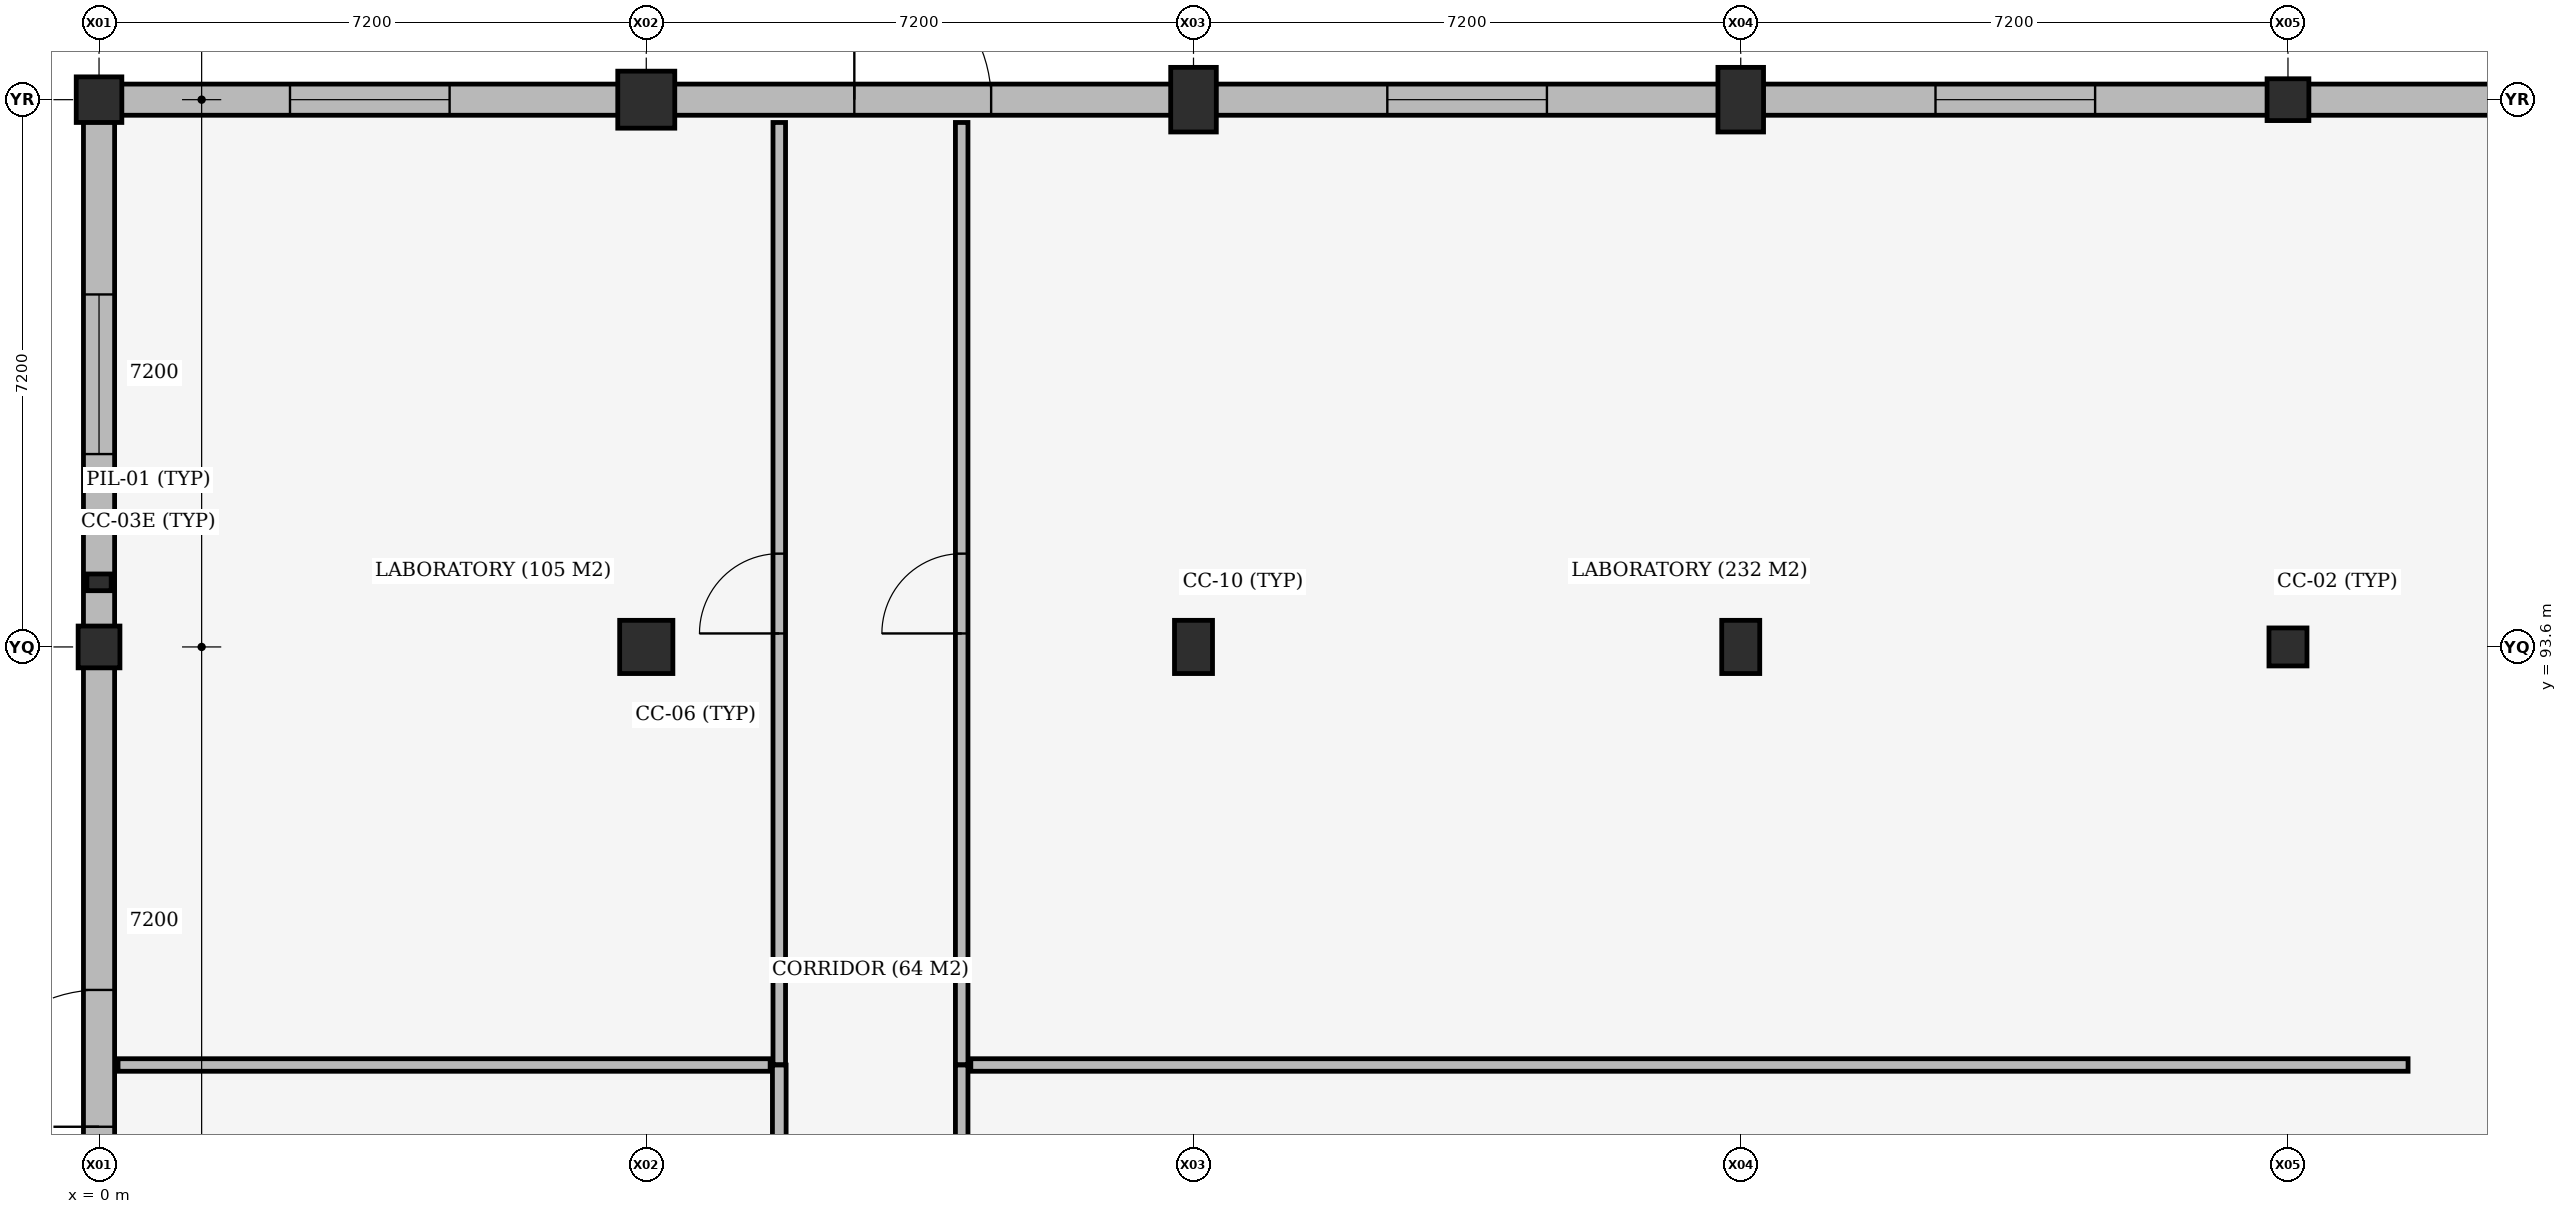
"""IFC4 building model, lengths in metres.
Left out: names, types, materials, properties, quantities, classifications, styles, units other than length and angle.
Written with IfcOpenShell. Run it as: python <this file> out.ifc"""

import sys

from ifc_helpers import new_model, si_unit, direction, frame, frame_2d, origin, origin_2d, place, context, subcontext, project, spatial, rectangle, extrude, element, fill, save


model = new_model("IFC4")
c1 = context("Model", 3, precision=1e-05, world=origin(), true_north=direction((0.0, 1.0)))
c2 = subcontext(c1, "Body", "Model", "MODEL_VIEW")
j1 = project(units=[si_unit("LENGTHUNIT", "METRE"), si_unit("PLANEANGLEUNIT", "RADIAN")], contexts=[c1])
p1 = place(None, origin())
s1 = spatial("IfcSite", under=j1, at=p1, CompositionType="ELEMENT")
p2 = place(p1, origin())
s2 = spatial("IfcBuilding", under=s1, at=p2, CompositionType="ELEMENT")
p3 = place(p2, origin())
s3 = spatial("IfcBuildingStorey", under=s2, at=p3, CompositionType="ELEMENT", Elevation=0.0)
p4 = place(p3, frame((0.0, 93.6, 0.0), z_axis=(0.0, 0.0, 1.0), x_axis=(1.0, 0.0, 0.0)))
e1 = element("IfcColumn", 1, at=p4, inside=s3, PredefinedType="COLUMN", context=c2, shape_type="SweptSolid", body=[
    extrude(rectangle(XDim=0.55, YDim=0.55, at=origin_2d()), origin(), (0.0, 0.0, 1.0), 5.1),
])
p5 = place(p3, frame((0.0, 100.8, 0.0), z_axis=(0.0, 0.0, 1.0), x_axis=(1.0, 0.0, 0.0)))
e2 = element("IfcColumn", 2, at=p5, inside=s3, PredefinedType="COLUMN", context=c2, shape_type="SweptSolid", body=[
    extrude(rectangle(XDim=0.6, YDim=0.6, at=origin_2d()), origin(), (0.0, 0.0, 1.0), 5.1),
])
p6 = place(p3, frame((7.2, 93.6, 0.0), z_axis=(0.0, 0.0, 1.0), x_axis=(1.0, 0.0, 0.0)))
e3 = element("IfcColumn", 3, at=p6, inside=s3, PredefinedType="COLUMN", context=c2, shape_type="SweptSolid", body=[
    extrude(rectangle(XDim=0.7, YDim=0.7, at=origin_2d()), origin(), (0.0, 0.0, 1.0), 5.1),
])
p7 = place(p3, frame((7.2, 100.8, 0.0), z_axis=(0.0, 0.0, 1.0), x_axis=(1.0, 0.0, 0.0)))
e4 = element("IfcColumn", 4, at=p7, inside=s3, PredefinedType="COLUMN", context=c2, shape_type="SweptSolid", body=[
    extrude(rectangle(XDim=0.75, YDim=0.75, at=origin_2d()), origin(), (0.0, 0.0, 1.0), 5.1),
])
p8 = place(p3, frame((14.4, 93.6, 0.0), z_axis=(0.0, 0.0, 1.0), x_axis=(1.0, 0.0, 0.0)))
e5 = element("IfcColumn", 5, at=p8, inside=s3, PredefinedType="COLUMN", context=c2, shape_type="SweptSolid", body=[
    extrude(rectangle(XDim=0.5, YDim=0.7, at=origin_2d()), origin(), (0.0, 0.0, 1.0), 5.1),
])
p9 = place(p3, frame((14.4, 100.8, 0.0), z_axis=(0.0, 0.0, 1.0), x_axis=(1.0, 0.0, 0.0)))
e6 = element("IfcColumn", 6, at=p9, inside=s3, PredefinedType="COLUMN", context=c2, shape_type="SweptSolid", body=[
    extrude(rectangle(XDim=0.6, YDim=0.85, at=origin_2d()), origin(), (0.0, 0.0, 1.0), 5.1),
])
p10 = place(p3, frame((21.6, 93.6, 0.0), z_axis=(0.0, 0.0, 1.0), x_axis=(1.0, 0.0, 0.0)))
e7 = element("IfcColumn", 7, at=p10, inside=s3, PredefinedType="COLUMN", context=c2, shape_type="SweptSolid", body=[
    extrude(rectangle(XDim=0.5, YDim=0.7, at=origin_2d()), origin(), (0.0, 0.0, 1.0), 5.1),
])
p11 = place(p3, frame((21.6, 100.8, 0.0), z_axis=(0.0, 0.0, 1.0), x_axis=(1.0, 0.0, 0.0)))
e8 = element("IfcColumn", 8, at=p11, inside=s3, PredefinedType="COLUMN", context=c2, shape_type="SweptSolid", body=[
    extrude(rectangle(XDim=0.6, YDim=0.85, at=origin_2d()), origin(), (0.0, 0.0, 1.0), 5.1),
])
p12 = place(p3, frame((28.8, 93.6, 0.0), z_axis=(0.0, 0.0, 1.0), x_axis=(1.0, 0.0, 0.0)))
e9 = element("IfcColumn", 9, at=p12, inside=s3, PredefinedType="COLUMN", context=c2, shape_type="SweptSolid", body=[
    extrude(rectangle(XDim=0.5, YDim=0.5, at=origin_2d()), origin(), (0.0, 0.0, 1.0), 5.1),
])
p13 = place(p3, frame((28.8, 100.8, 0.0), z_axis=(0.0, 0.0, 1.0), x_axis=(1.0, 0.0, 0.0)))
e10 = element("IfcColumn", 10, at=p13, inside=s3, PredefinedType="COLUMN", context=c2, shape_type="SweptSolid", body=[
    extrude(rectangle(XDim=0.55, YDim=0.55, at=origin_2d()), origin(), (0.0, 0.0, 1.0), 5.1),
])
p14 = place(p3, frame((0.0, 94.45, 0.0), z_axis=(0.0, 0.0, 1.0), x_axis=(1.0, 0.0, 0.0)))
e11 = element("IfcColumn", 11, at=p14, inside=s3, PredefinedType="PILASTER", context=c2, shape_type="SweptSolid", body=[
    extrude(rectangle(XDim=0.32, YDim=0.22, at=origin_2d()), origin(), (0.0, 0.0, 1.0), 5.1),
])
p15 = place(p3, frame((0.292, 100.8, 0.0), z_axis=(0.0, 0.0, 1.0), x_axis=(1.0, 0.0, 0.0)))
e12 = element("IfcWall", 12, at=p15, inside=s3, PredefinedType="STANDARD", context=c2, shape_type="SweptSolid", body=[
    extrude(rectangle(XDim=6.541, YDim=0.41, at=frame_2d((3.271, 0.0))), origin(), (0.0, 0.0, 1.0), 4.3),
])
p16 = place(p15, frame((2.22, 0.0, 0.8)))
e13 = element("IfcOpeningElement", 13, at=p16, cuts=e12, PredefinedType="OPENING", context=c2, shape_type="SweptSolid", body=[
    extrude(rectangle(XDim=2.1, YDim=3.0, at=frame_2d((1.05, 1.5))), frame((0.0, 0.215, 0.0), z_axis=(0.0, -1.0, 0.0), x_axis=(1.0, 0.0, 0.0)), (0.0, 0.0, 1.0), 0.43),
])
p17 = place(p3, frame((7.567, 100.8, 0.0), z_axis=(0.0, 0.0, 1.0), x_axis=(1.0, 0.0, 0.0)))
e14 = element("IfcWall", 14, at=p17, inside=s3, PredefinedType="STANDARD", context=c2, shape_type="SweptSolid", body=[
    extrude(rectangle(XDim=6.541, YDim=0.41, at=frame_2d((3.271, 0.0))), origin(), (0.0, 0.0, 1.0), 4.5),
])
p18 = place(p17, frame((2.371, 0.0, 0.0)))
e15 = element("IfcOpeningElement", 15, at=p18, cuts=e14, PredefinedType="OPENING", context=c2, shape_type="SweptSolid", body=[
    extrude(rectangle(XDim=1.8, YDim=2.2, at=frame_2d((0.9, 1.1))), frame((0.0, 0.215, 0.0), z_axis=(0.0, -1.0, 0.0), x_axis=(1.0, 0.0, 0.0)), (0.0, 0.0, 1.0), 0.43),
])
p19 = place(p3, frame((14.692, 100.8, 0.0), z_axis=(0.0, 0.0, 1.0), x_axis=(1.0, 0.0, 0.0)))
e16 = element("IfcWall", 16, at=p19, inside=s3, PredefinedType="STANDARD", context=c2, shape_type="SweptSolid", body=[
    extrude(rectangle(XDim=6.616, YDim=0.41, at=frame_2d((3.308, 0.0))), origin(), (0.0, 0.0, 1.0), 4.45),
])
p20 = place(p19, frame((2.258, 0.0, 0.8)))
e17 = element("IfcOpeningElement", 17, at=p20, cuts=e16, PredefinedType="OPENING", context=c2, shape_type="SweptSolid", body=[
    extrude(rectangle(XDim=2.1, YDim=3.0, at=frame_2d((1.05, 1.5))), frame((0.0, 0.215, 0.0), z_axis=(0.0, -1.0, 0.0), x_axis=(1.0, 0.0, 0.0)), (0.0, 0.0, 1.0), 0.43),
])
p21 = place(p3, frame((21.892, 100.8, 0.0), z_axis=(0.0, 0.0, 1.0), x_axis=(1.0, 0.0, 0.0)))
e18 = element("IfcWall", 18, at=p21, inside=s3, PredefinedType="STANDARD", context=c2, shape_type="SweptSolid", body=[
    extrude(rectangle(XDim=6.641, YDim=0.41, at=frame_2d((3.32, 0.0))), origin(), (0.0, 0.0, 1.0), 4.4),
])
p22 = place(p21, frame((2.271, 0.0, 0.8)))
e19 = element("IfcOpeningElement", 19, at=p22, cuts=e18, PredefinedType="OPENING", context=c2, shape_type="SweptSolid", body=[
    extrude(rectangle(XDim=2.1, YDim=3.0, at=frame_2d((1.05, 1.5))), frame((0.0, 0.215, 0.0), z_axis=(0.0, -1.0, 0.0), x_axis=(1.0, 0.0, 0.0)), (0.0, 0.0, 1.0), 0.43),
])
p23 = place(p3, frame((29.067, 100.8, 0.0), z_axis=(0.0, 0.0, 1.0), x_axis=(1.0, 0.0, 0.0)))
e20 = element("IfcWall", 20, at=p23, inside=s3, PredefinedType="STANDARD", context=c2, shape_type="SweptSolid", body=[
    extrude(rectangle(XDim=6.591, YDim=0.41, at=frame_2d((3.295, 0.0))), origin(), (0.0, 0.0, 1.0), 4.35),
])
p24 = place(p23, frame((2.396, 0.0, 0.0)))
e21 = element("IfcOpeningElement", 21, at=p24, cuts=e20, PredefinedType="OPENING", context=c2, shape_type="SweptSolid", body=[
    extrude(rectangle(XDim=1.8, YDim=2.2, at=frame_2d((0.9, 1.1))), frame((0.0, 0.215, 0.0), z_axis=(0.0, -1.0, 0.0), x_axis=(1.0, 0.0, 0.0)), (0.0, 0.0, 1.0), 0.43),
])
p25 = place(p3, frame((0.0, 83.042, 0.0), z_axis=(0.0, 0.0, 1.0), x_axis=(0.0, 1.0, 0.0)))
e22 = element("IfcWall", 22, at=p25, inside=s3, PredefinedType="STANDARD", context=c2, shape_type="SweptSolid", body=[
    extrude(rectangle(XDim=10.291, YDim=0.41, at=frame_2d((5.146, 0.0))), origin(), (0.0, 0.0, 1.0), 4.5),
])
p26 = place(p25, frame((4.246, 0.0, 0.0)))
e23 = element("IfcOpeningElement", 23, at=p26, cuts=e22, PredefinedType="OPENING", context=c2, shape_type="SweptSolid", body=[
    extrude(rectangle(XDim=1.8, YDim=2.2, at=frame_2d((0.9, 1.1))), frame((0.0, 0.215, 0.0), z_axis=(0.0, -1.0, 0.0), x_axis=(1.0, 0.0, 0.0)), (0.0, 0.0, 1.0), 0.43),
])
p27 = place(p3, frame((0.0, 93.867, 0.0), z_axis=(0.0, 0.0, 1.0), x_axis=(0.0, 1.0, 0.0)))
e24 = element("IfcWall", 24, at=p27, inside=s3, PredefinedType="STANDARD", context=c2, shape_type="SweptSolid", body=[
    extrude(rectangle(XDim=6.641, YDim=0.41, at=frame_2d((3.321, 0.0))), origin(), (0.0, 0.0, 1.0), 4.45),
])
p28 = place(p27, frame((2.271, 0.0, 0.8)))
e25 = element("IfcOpeningElement", 25, at=p28, cuts=e24, PredefinedType="OPENING", context=c2, shape_type="SweptSolid", body=[
    extrude(rectangle(XDim=2.1, YDim=3.0, at=frame_2d((1.05, 1.5))), frame((0.0, 0.215, 0.0), z_axis=(0.0, -1.0, 0.0), x_axis=(1.0, 0.0, 0.0)), (0.0, 0.0, 1.0), 0.43),
])
p29 = place(p3, frame((8.95, 75.605, 0.0), z_axis=(0.0, 0.0, 1.0), x_axis=(0.0, 1.0, 0.0)))
e26 = element("IfcWall", 26, at=p29, inside=s3, PredefinedType="PARTITIONING", context=c2, shape_type="SweptSolid", body=[
    extrude(rectangle(XDim=12.495, YDim=0.18, at=frame_2d((6.248, 0.0))), origin(), (0.0, 0.0, 1.0), 4.35),
])
p30 = place(p29, frame((5.752, 0.0, 0.0)))
e27 = element("IfcOpeningElement", 27, at=p30, cuts=e26, PredefinedType="OPENING", context=c2, shape_type="SweptSolid", body=[
    extrude(rectangle(XDim=0.99, YDim=2.18, at=frame_2d((0.495, 1.09))), frame((0.0, 0.1, 0.0), z_axis=(0.0, -1.0, 0.0), x_axis=(1.0, 0.0, 0.0)), (0.0, 0.0, 1.0), 0.2),
])
p31 = place(p3, frame((0.25, 88.1, 0.0), z_axis=(0.0, 0.0, 1.0), x_axis=(1.0, 0.0, 0.0)))
e28 = element("IfcWall", 28, at=p31, inside=s3, PredefinedType="PARTITIONING", context=c2, shape_type="SweptSolid", body=[
    extrude(rectangle(XDim=8.58, YDim=0.165, at=frame_2d((4.29, 0.0))), origin(), (0.0, 0.0, 1.0), 4.45),
])
p32 = place(p3, frame((8.95, 88.105, 0.0), z_axis=(0.0, 0.0, 1.0), x_axis=(0.0, 1.0, 0.0)))
e29 = element("IfcWall", 29, at=p32, inside=s3, PredefinedType="PARTITIONING", context=c2, shape_type="SweptSolid", body=[
    extrude(rectangle(XDim=12.395, YDim=0.165, at=frame_2d((6.198, 0.0))), origin(), (0.0, 0.0, 1.0), 4.3),
])
p33 = place(p32, frame((5.673, 0.0, 0.0)))
e30 = element("IfcOpeningElement", 30, at=p33, cuts=e29, PredefinedType="OPENING", context=c2, shape_type="SweptSolid", body=[
    extrude(rectangle(XDim=1.05, YDim=2.2, at=frame_2d((0.525, 1.1))), frame((0.0, 0.093, 0.0), z_axis=(0.0, -1.0, 0.0), x_axis=(1.0, 0.0, 0.0)), (0.0, 0.0, 1.0), 0.185),
])
p34 = place(p3, frame((11.35, 75.605, 0.0), z_axis=(0.0, 0.0, 1.0), x_axis=(0.0, 1.0, 0.0)))
e31 = element("IfcWall", 31, at=p34, inside=s3, PredefinedType="PARTITIONING", context=c2, shape_type="SweptSolid", body=[
    extrude(rectangle(XDim=12.495, YDim=0.165, at=frame_2d((6.248, 0.0))), origin(), (0.0, 0.0, 1.0), 4.35),
])
p35 = place(p34, frame((5.718, 0.0, 0.0)))
e32 = element("IfcOpeningElement", 32, at=p35, cuts=e31, PredefinedType="OPENING", context=c2, shape_type="SweptSolid", body=[
    extrude(rectangle(XDim=1.06, YDim=2.2, at=frame_2d((0.53, 1.1))), frame((0.0, 0.093, 0.0), z_axis=(0.0, -1.0, 0.0), x_axis=(1.0, 0.0, 0.0)), (0.0, 0.0, 1.0), 0.185),
])
p36 = place(p3, frame((11.47, 88.1, 0.0), z_axis=(0.0, 0.0, 1.0), x_axis=(1.0, 0.0, 0.0)))
e33 = element("IfcWall", 33, at=p36, inside=s3, PredefinedType="PARTITIONING", context=c2, shape_type="SweptSolid", body=[
    extrude(rectangle(XDim=18.91, YDim=0.165, at=frame_2d((9.455, 0.0))), origin(), (0.0, 0.0, 1.0), 4.35),
])
p37 = place(p3, frame((11.35, 88.105, 0.0), z_axis=(0.0, 0.0, 1.0), x_axis=(0.0, 1.0, 0.0)))
e34 = element("IfcWall", 34, at=p37, inside=s3, PredefinedType="PARTITIONING", context=c2, shape_type="SweptSolid", body=[
    extrude(rectangle(XDim=12.395, YDim=0.165, at=frame_2d((6.198, 0.0))), origin(), (0.0, 0.0, 1.0), 4.3),
])
p38 = place(p37, frame((5.673, 0.0, 0.0)))
e35 = element("IfcOpeningElement", 35, at=p38, cuts=e34, PredefinedType="OPENING", context=c2, shape_type="SweptSolid", body=[
    extrude(rectangle(XDim=1.05, YDim=2.2, at=frame_2d((0.525, 1.1))), frame((0.0, 0.093, 0.0), z_axis=(0.0, -1.0, 0.0), x_axis=(1.0, 0.0, 0.0)), (0.0, 0.0, 1.0), 0.185),
])
p39 = place(p16, origin())
e36 = element("IfcWindow", 36, at=p39, inside=s3, PartitioningType="DOUBLE_PANEL_VERTICAL", PredefinedType="WINDOW", context=c2, shape_type="SweptSolid", body=[
    extrude(rectangle(XDim=2.1, YDim=3.0, at=frame_2d((1.05, 1.5))), frame((0.0, 0.03, 0.0), z_axis=(0.0, -1.0, 0.0), x_axis=(1.0, 0.0, 0.0)), (0.0, 0.0, 1.0), 0.06),
])
fill(e13, e36)
p40 = place(p18, origin())
e37 = element("IfcDoor", 37, at=p40, inside=s3, OperationType="DOUBLE_DOOR_SINGLE_SWING", PredefinedType="DOOR", context=c2, shape_type="SweptSolid", body=[
    extrude(rectangle(XDim=1.8, YDim=2.2, at=frame_2d((0.9, 1.1))), frame((0.0, 0.025, 0.0), z_axis=(0.0, -1.0, 0.0), x_axis=(1.0, 0.0, 0.0)), (0.0, 0.0, 1.0), 0.05),
])
fill(e15, e37)
p41 = place(p20, origin())
e38 = element("IfcWindow", 38, at=p41, inside=s3, PartitioningType="DOUBLE_PANEL_VERTICAL", PredefinedType="WINDOW", context=c2, shape_type="SweptSolid", body=[
    extrude(rectangle(XDim=2.1, YDim=3.0, at=frame_2d((1.05, 1.5))), frame((0.0, 0.03, 0.0), z_axis=(0.0, -1.0, 0.0), x_axis=(1.0, 0.0, 0.0)), (0.0, 0.0, 1.0), 0.06),
])
fill(e17, e38)
p42 = place(p22, origin())
e39 = element("IfcWindow", 39, at=p42, inside=s3, PartitioningType="DOUBLE_PANEL_VERTICAL", PredefinedType="WINDOW", context=c2, shape_type="SweptSolid", body=[
    extrude(rectangle(XDim=2.1, YDim=3.0, at=frame_2d((1.05, 1.5))), frame((0.0, 0.03, 0.0), z_axis=(0.0, -1.0, 0.0), x_axis=(1.0, 0.0, 0.0)), (0.0, 0.0, 1.0), 0.06),
])
fill(e19, e39)
p43 = place(p26, origin())
e40 = element("IfcDoor", 40, at=p43, inside=s3, OperationType="DOUBLE_DOOR_SINGLE_SWING", PredefinedType="DOOR", context=c2, shape_type="SweptSolid", body=[
    extrude(rectangle(XDim=1.8, YDim=2.2, at=frame_2d((0.9, 1.1))), frame((0.0, 0.025, 0.0), z_axis=(0.0, -1.0, 0.0), x_axis=(1.0, 0.0, 0.0)), (0.0, 0.0, 1.0), 0.05),
])
fill(e23, e40)
p44 = place(p28, origin())
e41 = element("IfcWindow", 41, at=p44, inside=s3, PartitioningType="DOUBLE_PANEL_VERTICAL", PredefinedType="WINDOW", context=c2, shape_type="SweptSolid", body=[
    extrude(rectangle(XDim=2.1, YDim=3.0, at=frame_2d((1.05, 1.5))), frame((0.0, 0.03, 0.0), z_axis=(0.0, -1.0, 0.0), x_axis=(1.0, 0.0, 0.0)), (0.0, 0.0, 1.0), 0.06),
])
fill(e25, e41)
p45 = place(p33, origin())
e42 = element("IfcDoor", 42, at=p45, inside=s3, OperationType="SINGLE_SWING_LEFT", PredefinedType="DOOR", context=c2, shape_type="SweptSolid", body=[
    extrude(rectangle(XDim=1.05, YDim=2.2, at=frame_2d((0.525, 1.1))), frame((0.0, 0.025, 0.0), z_axis=(0.0, -1.0, 0.0), x_axis=(1.0, 0.0, 0.0)), (0.0, 0.0, 1.0), 0.05),
])
fill(e30, e42)
p46 = place(p38, origin())
e43 = element("IfcDoor", 43, at=p46, inside=s3, OperationType="SINGLE_SWING_LEFT", PredefinedType="DOOR", context=c2, shape_type="SweptSolid", body=[
    extrude(rectangle(XDim=1.05, YDim=2.2, at=frame_2d((0.525, 1.1))), frame((0.0, 0.025, 0.0), z_axis=(0.0, -1.0, 0.0), x_axis=(1.0, 0.0, 0.0)), (0.0, 0.0, 1.0), 0.05),
])
fill(e35, e43)
save(model, sys.argv[1])
